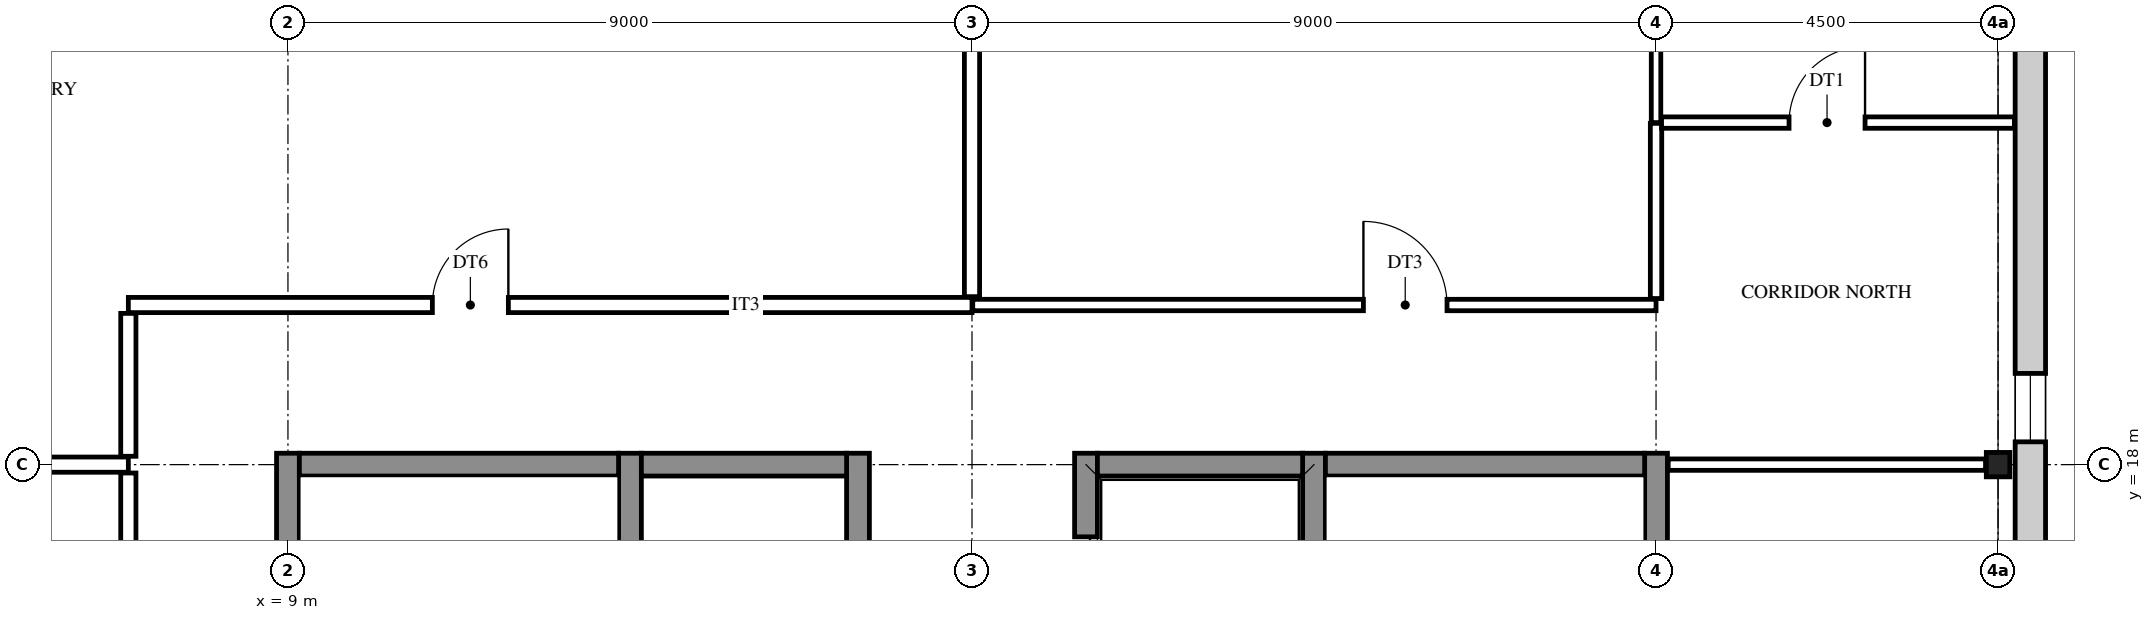
"""IFC4 building model, lengths in metres.
Left out: names, types, materials, properties, quantities, classifications, styles, units other than length and angle.
Written with IfcOpenShell. Run it as: python <this file> out.ifc"""

import sys

from ifc_helpers import new_model, si_unit, direction, frame, frame_2d, origin, origin_2d, place, context, subcontext, project, spatial, rectangle, i_section, extrude, element, fill, save


model = new_model("IFC4")
c1 = context("Model", 3, precision=1e-05, world=origin(), true_north=direction((0.0, 1.0)))
c2 = subcontext(c1, "Body", "Model", "MODEL_VIEW")
j1 = project(units=[si_unit("LENGTHUNIT", "METRE"), si_unit("PLANEANGLEUNIT", "RADIAN")], contexts=[c1])
p1 = place(None, origin())
s1 = spatial("IfcSite", under=j1, at=p1, CompositionType="ELEMENT")
p2 = place(p1, origin())
s2 = spatial("IfcBuilding", under=s1, at=p2, CompositionType="ELEMENT")
p3 = place(p2, frame((0.0, 0.0, 44.4)))
s3 = spatial("IfcBuildingStorey", under=s2, at=p3, CompositionType="ELEMENT", Elevation=44.4)
p4 = place(p3, frame((31.5, 18.0, 0.0), z_axis=(0.0, 0.0, 1.0), x_axis=(1.0, 0.0, 0.0)))
e1 = element("IfcColumn", 1, at=p4, inside=s3, PredefinedType="COLUMN", context=c2, shape_type="SweptSolid", body=[
    extrude(i_section(OverallWidth=0.309, OverallDepth=0.321, WebThickness=0.014, FlangeThickness=0.022, FilletRadius=0.017, at=origin_2d()), origin(), (0.0, 0.0, 1.0), 4.2),
])
for number, where, z_axis, x_axis in (
    (2, (9.0, 8.85, 0.0), (0.0, 0.0, 1.0), (0.0, 1.0, 0.0)),
    (3, (13.5, 8.85, 0.0), (0.0, 0.0, 1.0), (0.0, 1.0, 0.0)),
):
    element("IfcWall", number, at=place(p3, frame(where, z_axis=z_axis, x_axis=x_axis)), inside=s3, PredefinedType="SHEAR", context=c2, shape_type="SweptSolid", body=[
        extrude(rectangle(XDim=9.3, YDim=0.3, at=frame_2d((4.65, 0.0))), origin(), (0.0, 0.0, 1.0), 4.2),
    ])
p5 = place(p3, frame((16.5, 8.85, 0.0), z_axis=(0.0, 0.0, 1.0), x_axis=(0.0, 1.0, 0.0)))
e4 = element("IfcWall", 4, at=p5, inside=s3, PredefinedType="SHEAR", context=c2, shape_type="SweptSolid", body=[
    extrude(rectangle(XDim=9.3, YDim=0.3, at=frame_2d((4.65, 0.0))), origin(), (0.0, 0.0, 1.0), 4.2),
])
p6 = place(p5, frame((1.1, 0.0, 0.0)))
e5 = element("IfcOpeningElement", 5, at=p6, cuts=e4, PredefinedType="OPENING", context=c2, shape_type="SweptSolid", body=[
    extrude(rectangle(XDim=1.1, YDim=2.1, at=frame_2d((0.55, 1.05))), frame((0.0, 0.16, 0.0), z_axis=(0.0, -1.0, 0.0), x_axis=(1.0, 0.0, 0.0)), (0.0, 0.0, 1.0), 0.32),
])
p7 = place(p5, frame((4.1, 0.0, 0.0)))
e6 = element("IfcOpeningElement", 6, at=p7, cuts=e4, PredefinedType="OPENING", context=c2, shape_type="SweptSolid", body=[
    extrude(rectangle(XDim=1.1, YDim=2.1, at=frame_2d((0.55, 1.05))), frame((0.0, 0.16, 0.0), z_axis=(0.0, -1.0, 0.0), x_axis=(1.0, 0.0, 0.0)), (0.0, 0.0, 1.0), 0.32),
])
p8 = place(p3, frame((19.5, 8.85, 0.0), z_axis=(0.0, 0.0, 1.0), x_axis=(0.0, 1.0, 0.0)))
e7 = element("IfcWall", 7, at=p8, inside=s3, PredefinedType="SHEAR", context=c2, shape_type="SweptSolid", body=[
    extrude(rectangle(XDim=9.3, YDim=0.3, at=frame_2d((4.65, 0.0))), origin(), (0.0, 0.0, 1.0), 4.2),
])
p9 = place(p8, frame((3.95, 0.0, 0.0)))
e8 = element("IfcOpeningElement", 8, at=p9, cuts=e7, PredefinedType="OPENING", context=c2, shape_type="SweptSolid", body=[
    extrude(rectangle(XDim=1.4, YDim=2.1, at=frame_2d((0.7, 1.05))), frame((0.0, 0.16, 0.0), z_axis=(0.0, -1.0, 0.0), x_axis=(1.0, 0.0, 0.0)), (0.0, 0.0, 1.0), 0.32),
])
p10 = place(p8, frame((7.1, 0.0, 0.0)))
e9 = element("IfcOpeningElement", 9, at=p10, cuts=e7, PredefinedType="OPENING", context=c2, shape_type="SweptSolid", body=[
    extrude(rectangle(XDim=1.1, YDim=2.1, at=frame_2d((0.55, 1.05))), frame((0.0, 0.16, 0.0), z_axis=(0.0, -1.0, 0.0), x_axis=(1.0, 0.0, 0.0)), (0.0, 0.0, 1.0), 0.32),
])
for number, where, z_axis, x_axis in (
    (10, (22.5, 8.85, 0.0), (0.0, 0.0, 1.0), (0.0, 1.0, 0.0)),
    (11, (27.0, 8.85, 0.0), (0.0, 0.0, 1.0), (0.0, 1.0, 0.0)),
):
    element("IfcWall", number, at=place(p3, frame(where, z_axis=z_axis, x_axis=x_axis)), inside=s3, PredefinedType="SHEAR", context=c2, shape_type="SweptSolid", body=[
        extrude(rectangle(XDim=9.3, YDim=0.3, at=frame_2d((4.65, 0.0))), origin(), (0.0, 0.0, 1.0), 4.2),
    ])
p11 = place(p3, frame((9.15, 18.0, 0.0), z_axis=(0.0, 0.0, 1.0), x_axis=(1.0, 0.0, 0.0)))
e12 = element("IfcWall", 12, at=p11, inside=s3, PredefinedType="SHEAR", context=c2, shape_type="SweptSolid", body=[
    extrude(rectangle(XDim=4.2, YDim=0.3, at=frame_2d((2.1, 0.0))), origin(), (0.0, 0.0, 1.0), 4.2),
])
for number, where, z_axis, x_axis in (
    (13, (13.65, 18.0, 0.0), (0.0, 0.0, 1.0), (1.0, 0.0, 0.0)),
    (14, (19.65, 18.0, 0.0), (0.0, 0.0, 1.0), (1.0, 0.0, 0.0)),
):
    element("IfcWall", number, at=place(p3, frame(where, z_axis=z_axis, x_axis=x_axis)), inside=s3, PredefinedType="SHEAR", context=c2, shape_type="SweptSolid", body=[
        extrude(rectangle(XDim=2.7, YDim=0.3, at=frame_2d((1.35, 0.0))), origin(), (0.0, 0.0, 1.0), 4.2),
    ])
p12 = place(p3, frame((22.65, 18.0, 0.0), z_axis=(0.0, 0.0, 1.0), x_axis=(1.0, 0.0, 0.0)))
e15 = element("IfcWall", 15, at=p12, inside=s3, PredefinedType="SHEAR", context=c2, shape_type="SweptSolid", body=[
    extrude(rectangle(XDim=4.2, YDim=0.3, at=frame_2d((2.1, 0.0))), origin(), (0.0, 0.0, 1.0), 4.2),
])
p13 = place(p3, frame((31.925, 27.225, 0.0), z_axis=(0.0, 0.0, 1.0), x_axis=(0.0, -1.0, 0.0)))
e16 = element("IfcWall", 16, at=p13, inside=s3, PredefinedType="STANDARD", context=c2, shape_type="SweptSolid", body=[
    extrude(rectangle(XDim=27.45, YDim=0.4, at=frame_2d((13.725, 0.0))), origin(), (0.0, 0.0, 1.0), 4.2),
])
p14 = place(p13, frame((26.025, 0.0, 0.9)))
e17 = element("IfcOpeningElement", 17, at=p14, cuts=e16, PredefinedType="OPENING", context=c2, shape_type="SweptSolid", body=[
    extrude(rectangle(XDim=0.9, YDim=2.0, at=frame_2d((0.45, 1.0))), frame((0.0, 0.21, 0.0), z_axis=(0.0, -1.0, 0.0), x_axis=(1.0, 0.0, 0.0)), (0.0, 0.0, 1.0), 0.42),
])
p15 = place(p13, frame((18.525, 0.0, 0.9)))
e18 = element("IfcOpeningElement", 18, at=p15, cuts=e16, PredefinedType="OPENING", context=c2, shape_type="SweptSolid", body=[
    extrude(rectangle(XDim=0.9, YDim=2.0, at=frame_2d((0.45, 1.0))), frame((0.0, 0.21, 0.0), z_axis=(0.0, -1.0, 0.0), x_axis=(1.0, 0.0, 0.0)), (0.0, 0.0, 1.0), 0.42),
])
p16 = place(p13, frame((15.675, 0.0, 1.6)))
e19 = element("IfcOpeningElement", 19, at=p16, cuts=e16, PredefinedType="OPENING", context=c2, shape_type="SweptSolid", body=[
    extrude(rectangle(XDim=0.6, YDim=0.9, at=frame_2d((0.3, 0.45))), frame((0.0, 0.21, 0.0), z_axis=(0.0, -1.0, 0.0), x_axis=(1.0, 0.0, 0.0)), (0.0, 0.0, 1.0), 0.42),
])
p17 = place(p13, frame((11.175, 0.0, 1.6)))
e20 = element("IfcOpeningElement", 20, at=p17, cuts=e16, PredefinedType="OPENING", context=c2, shape_type="SweptSolid", body=[
    extrude(rectangle(XDim=0.6, YDim=0.9, at=frame_2d((0.3, 0.45))), frame((0.0, 0.21, 0.0), z_axis=(0.0, -1.0, 0.0), x_axis=(1.0, 0.0, 0.0)), (0.0, 0.0, 1.0), 0.42),
])
p18 = place(p13, frame((8.025, 0.0, 0.9)))
e21 = element("IfcOpeningElement", 21, at=p18, cuts=e16, PredefinedType="OPENING", context=c2, shape_type="SweptSolid", body=[
    extrude(rectangle(XDim=0.9, YDim=2.0, at=frame_2d((0.45, 1.0))), frame((0.0, 0.21, 0.0), z_axis=(0.0, -1.0, 0.0), x_axis=(1.0, 0.0, 0.0)), (0.0, 0.0, 1.0), 0.42),
])
p19 = place(p13, frame((0.525, 0.0, 0.9)))
e22 = element("IfcOpeningElement", 22, at=p19, cuts=e16, PredefinedType="OPENING", context=c2, shape_type="SweptSolid", body=[
    extrude(rectangle(XDim=0.9, YDim=2.0, at=frame_2d((0.45, 1.0))), frame((0.0, 0.21, 0.0), z_axis=(0.0, -1.0, 0.0), x_axis=(1.0, 0.0, 0.0)), (0.0, 0.0, 1.0), 0.42),
])
p20 = place(p3, frame((6.9, 13.61, 0.0), z_axis=(0.0, 0.0, 1.0), x_axis=(0.0, 1.0, 0.0)))
e23 = element("IfcWall", 23, at=p20, inside=s3, PredefinedType="PARTITIONING", context=c2, shape_type="SweptSolid", body=[
    extrude(rectangle(XDim=4.28, YDim=0.2, at=frame_2d((2.14, 0.0))), origin(), (0.0, 0.0, 1.0), 3.542),
])
p21 = place(p20, frame((1.64, 0.0, 0.0)))
e24 = element("IfcOpeningElement", 24, at=p21, cuts=e23, PredefinedType="OPENING", context=c2, shape_type="SweptSolid", body=[
    extrude(rectangle(XDim=1.0, YDim=2.1, at=frame_2d((0.5, 1.05))), frame((0.0, 0.11, 0.0), z_axis=(0.0, -1.0, 0.0), x_axis=(1.0, 0.0, 0.0)), (0.0, 0.0, 1.0), 0.22),
])
p22 = place(p3, frame((6.9, 18.11, 0.0), z_axis=(0.0, 0.0, 1.0), x_axis=(0.0, 1.0, 0.0)))
e25 = element("IfcWall", 25, at=p22, inside=s3, PredefinedType="PARTITIONING", context=c2, shape_type="SweptSolid", body=[
    extrude(rectangle(XDim=1.88, YDim=0.2, at=frame_2d((0.94, 0.0))), origin(), (0.0, 0.0, 1.0), 3.542),
])
p23 = place(p3, frame((18.0, 20.21, 0.0), z_axis=(0.0, 0.0, 1.0), x_axis=(0.0, 1.0, 0.0)))
e26 = element("IfcWall", 26, at=p23, inside=s3, PredefinedType="PARTITIONING", context=c2, shape_type="SweptSolid", body=[
    extrude(rectangle(XDim=6.62, YDim=0.2, at=frame_2d((3.31, 0.0))), origin(), (0.0, 0.0, 1.0), 3.542),
])
p24 = place(p3, frame((27.0, 20.185, 0.0), z_axis=(0.0, 0.0, 1.0), x_axis=(0.0, 1.0, 0.0)))
e27 = element("IfcWall", 27, at=p24, inside=s3, PredefinedType="PARTITIONING", context=c2, shape_type="SweptSolid", body=[
    extrude(rectangle(XDim=2.305, YDim=0.15, at=frame_2d((1.152, 0.0))), origin(), (0.0, 0.0, 1.0), 3.542),
])
p25 = place(p3, frame((27.0, 22.5, 0.0), z_axis=(0.0, 0.0, 1.0), x_axis=(0.0, 1.0, 0.0)))
e28 = element("IfcWall", 28, at=p25, inside=s3, PredefinedType="PARTITIONING", context=c2, shape_type="SweptSolid", body=[
    extrude(rectangle(XDim=4.33, YDim=0.125, at=frame_2d((2.165, 0.0))), origin(), (0.0, 0.0, 1.0), 3.542),
])
p26 = place(p3, frame((0.165, 18.0, 0.0), z_axis=(0.0, 0.0, 1.0), x_axis=(1.0, 0.0, 0.0)))
e29 = element("IfcWall", 29, at=p26, inside=s3, PredefinedType="PARTITIONING", context=c2, shape_type="SweptSolid", body=[
    extrude(rectangle(XDim=6.735, YDim=0.2, at=frame_2d((3.368, 0.0))), origin(), (0.0, 0.0, 1.0), 3.542),
])
p27 = place(p3, frame((27.16, 18.0, 0.0), z_axis=(0.0, 0.0, 1.0), x_axis=(1.0, 0.0, 0.0)))
e30 = element("IfcWall", 30, at=p27, inside=s3, PredefinedType="PARTITIONING", context=c2, shape_type="SweptSolid", body=[
    extrude(rectangle(XDim=4.176, YDim=0.15, at=frame_2d((2.088, 0.0))), origin(), (0.0, 0.0, 1.0), 3.542),
])
p28 = place(p3, frame((6.9, 20.1, 0.0), z_axis=(0.0, 0.0, 1.0), x_axis=(1.0, 0.0, 0.0)))
e31 = element("IfcWall", 31, at=p28, inside=s3, PredefinedType="PARTITIONING", context=c2, shape_type="SweptSolid", body=[
    extrude(rectangle(XDim=11.1, YDim=0.2, at=frame_2d((5.55, 0.0))), origin(), (0.0, 0.0, 1.0), 3.542),
])
p29 = place(p28, frame((4.0, 0.0, 0.0)))
e32 = element("IfcOpeningElement", 32, at=p29, cuts=e31, PredefinedType="OPENING", context=c2, shape_type="SweptSolid", body=[
    extrude(rectangle(XDim=1.0, YDim=2.1, at=frame_2d((0.5, 1.05))), frame((0.0, 0.11, 0.0), z_axis=(0.0, -1.0, 0.0), x_axis=(1.0, 0.0, 0.0)), (0.0, 0.0, 1.0), 0.22),
])
p30 = place(p3, frame((18.01, 20.1, 0.0), z_axis=(0.0, 0.0, 1.0), x_axis=(1.0, 0.0, 0.0)))
e33 = element("IfcWall", 33, at=p30, inside=s3, PredefinedType="PARTITIONING", context=c2, shape_type="SweptSolid", body=[
    extrude(rectangle(XDim=8.99, YDim=0.15, at=frame_2d((4.495, 0.0))), origin(), (0.0, 0.0, 1.0), 3.542),
])
p31 = place(p30, frame((5.14, 0.0, 0.0)))
e34 = element("IfcOpeningElement", 34, at=p31, cuts=e33, PredefinedType="OPENING", context=c2, shape_type="SweptSolid", body=[
    extrude(rectangle(XDim=1.1, YDim=2.1, at=frame_2d((0.55, 1.05))), frame((0.0, 0.085, 0.0), z_axis=(0.0, -1.0, 0.0), x_axis=(1.0, 0.0, 0.0)), (0.0, 0.0, 1.0), 0.17),
])
p32 = place(p3, frame((27.073, 22.5, 0.0), z_axis=(0.0, 0.0, 1.0), x_axis=(1.0, 0.0, 0.0)))
e35 = element("IfcWall", 35, at=p32, inside=s3, PredefinedType="PARTITIONING", context=c2, shape_type="SweptSolid", body=[
    extrude(rectangle(XDim=4.643, YDim=0.15, at=frame_2d((2.321, 0.0))), origin(), (0.0, 0.0, 1.0), 3.542),
])
p33 = place(p32, frame((1.677, 0.0, 0.0)))
e36 = element("IfcOpeningElement", 36, at=p33, cuts=e35, PredefinedType="OPENING", context=c2, shape_type="SweptSolid", body=[
    extrude(rectangle(XDim=1.0, YDim=2.1, at=frame_2d((0.5, 1.05))), frame((0.0, 0.085, 0.0), z_axis=(0.0, -1.0, 0.0), x_axis=(1.0, 0.0, 0.0)), (0.0, 0.0, 1.0), 0.17),
])
p34 = place(p18, origin())
e37 = element("IfcWindow", 37, at=p34, inside=s3, PartitioningType="SINGLE_PANEL", PredefinedType="WINDOW", context=c2, shape_type="SweptSolid", body=[
    extrude(rectangle(XDim=0.9, YDim=2.0, at=frame_2d((0.45, 1.0))), frame((0.0, 0.03, 0.0), z_axis=(0.0, -1.0, 0.0), x_axis=(1.0, 0.0, 0.0)), (0.0, 0.0, 1.0), 0.06),
])
fill(e21, e37)
p35 = place(p29, origin())
e38 = element("IfcDoor", 38, at=p35, inside=s3, OperationType="SINGLE_SWING_RIGHT", PredefinedType="DOOR", context=c2, shape_type="SweptSolid", body=[
    extrude(rectangle(XDim=1.0, YDim=2.1, at=frame_2d((0.5, 1.05))), frame((0.0, 0.025, 0.0), z_axis=(0.0, -1.0, 0.0), x_axis=(1.0, 0.0, 0.0)), (0.0, 0.0, 1.0), 0.05),
])
fill(e32, e38)
p36 = place(p31, origin())
e39 = element("IfcDoor", 39, at=p36, inside=s3, OperationType="SINGLE_SWING_LEFT", PredefinedType="DOOR", context=c2, shape_type="SweptSolid", body=[
    extrude(rectangle(XDim=1.1, YDim=2.1, at=frame_2d((0.55, 1.05))), frame((0.0, 0.025, 0.0), z_axis=(0.0, -1.0, 0.0), x_axis=(1.0, 0.0, 0.0)), (0.0, 0.0, 1.0), 0.05),
])
fill(e34, e39)
p37 = place(p33, origin())
e40 = element("IfcDoor", 40, at=p37, inside=s3, OperationType="SINGLE_SWING_RIGHT", PredefinedType="DOOR", context=c2, shape_type="SweptSolid", body=[
    extrude(rectangle(XDim=1.0, YDim=2.1, at=frame_2d((0.5, 1.05))), frame((0.0, 0.025, 0.0), z_axis=(0.0, -1.0, 0.0), x_axis=(1.0, 0.0, 0.0)), (0.0, 0.0, 1.0), 0.05),
])
fill(e36, e40)
p38 = place(p10, origin())
e41 = element("IfcDoor", 41, at=p38, inside=s3, OperationType="DOUBLE_DOOR_SLIDING", PredefinedType="DOOR", context=c2, shape_type="SweptSolid", body=[
    extrude(rectangle(XDim=1.1, YDim=2.1, at=frame_2d((0.55, 1.05))), frame((0.0, 0.025, 0.0), z_axis=(0.0, -1.0, 0.0), x_axis=(1.0, 0.0, 0.0)), (0.0, 0.0, 1.0), 0.05),
])
fill(e9, e41)
save(model, sys.argv[1])
